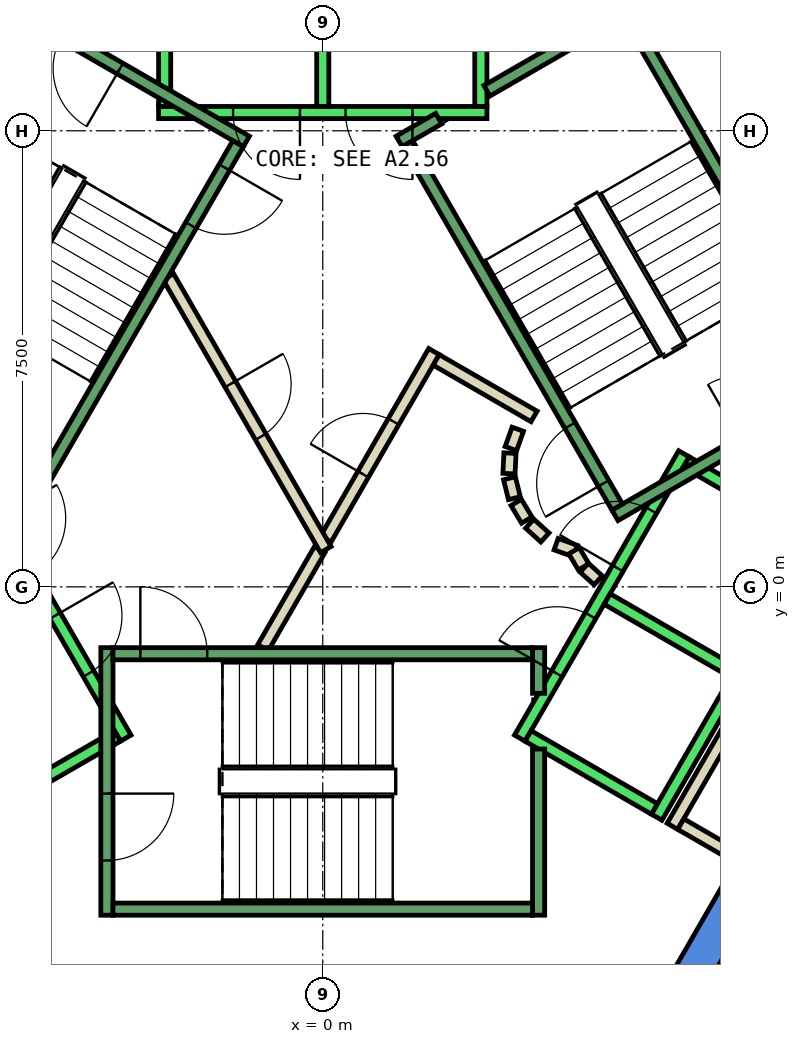
"""IFC4 building model, lengths in metres.
Left out: names, types, materials, properties, quantities, classifications, styles, units other than length and angle.
Written with IfcOpenShell. Run it as: python <this file> out.ifc"""

import sys

from ifc_helpers import new_model, si_unit, direction, frame, frame_2d, origin, place, context, subcontext, project, spatial, polyline, rectangle, outline, extrude, element, fill, save


model = new_model("IFC4")
c1 = context("Model", 3, precision=1e-05, world=origin(), true_north=direction((0.0, 1.0)))
c2 = subcontext(c1, "Body", "Model", "MODEL_VIEW")
j1 = project(units=[si_unit("LENGTHUNIT", "METRE"), si_unit("PLANEANGLEUNIT", "RADIAN")], contexts=[c1])
p1 = place(None, origin())
s1 = spatial("IfcSite", under=j1, at=p1, CompositionType="ELEMENT")
p2 = place(p1, origin())
s2 = spatial("IfcBuilding", under=s1, at=p2, CompositionType="ELEMENT")
p3 = place(p2, frame((0.0, 0.0, 266.6)))
s3 = spatial("IfcBuildingStorey", under=s2, at=p3, CompositionType="ELEMENT", Elevation=266.6)
p4 = place(p3, frame((0.0, 0.0, -0.34)))
e1 = element("IfcWall", 1, at=p4, inside=s3, PredefinedType="SHEAR", context=c2, shape_type="SweptSolid", body=[
    extrude(outline(polyline([(6.786, 10.747), (6.266, 10.447), (10.854, 2.5), (11.547, 2.5), (6.786, 10.747)])), origin(), (0.0, 0.0, 1.0), 3.6),
])
p5 = place(p3, frame((0.0, 0.0, -0.34)))
e2 = element("IfcWall", 2, at=p5, inside=s3, PredefinedType="SHEAR", context=c2, shape_type="SweptSolid", body=[
    extrude(outline(polyline([(5.774, -7.5), (11.547, 2.5), (10.854, 2.5), (5.427, -6.9), (5.774, -7.5)])), origin(), (0.0, 0.0, 1.0), 3.6),
])
p6 = place(p3, frame((5.751, -3.938, 0.0), z_axis=(0.0, 0.0, 1.0), x_axis=(0.500034260056, 0.866005622828, 0.0)))
e3 = element("IfcWall", 3, at=p6, inside=s3, PredefinedType="PARTITIONING", context=c2, shape_type="SweptSolid", body=[
    extrude(rectangle(XDim=5.399, YDim=0.2, at=frame_2d((2.7, 0.0))), origin(), (0.0, 0.0, 1.0), 3.26),
])
p7 = place(p3, frame((6.841, -4.452, 0.0), z_axis=(0.0, 0.0, 1.0), x_axis=(-0.86621513555, 0.499671230855, 0.0)))
e4 = element("IfcWall", 4, at=p7, inside=s3, PredefinedType="PARTITIONING", context=c2, shape_type="SweptSolid", body=[
    extrude(rectangle(XDim=1.1, YDim=0.2, at=frame_2d((0.55, 0.0))), origin(), (0.0, 0.0, 1.0), 3.26),
])
p8 = place(p3, frame((-0.982, -1.0, 0.0), z_axis=(0.0, 0.0, 1.0), x_axis=(0.50024047865, 0.865886518847, 0.0)))
e5 = element("IfcWall", 5, at=p8, inside=s3, PredefinedType="PARTITIONING", context=c2, shape_type="SweptSolid", body=[
    extrude(rectangle(XDim=1.863, YDim=0.2, at=frame_2d((0.931, 0.0))), origin(), (0.0, 0.0, 1.0), 3.26),
])
p9 = place(p3, frame((0.05, 0.787, 0.0), z_axis=(0.0, 0.0, 1.0), x_axis=(0.499954076797, 0.866051915934, 0.0)))
e6 = element("IfcWall", 6, at=p9, inside=s3, PredefinedType="PARTITIONING", context=c2, shape_type="SweptSolid", body=[
    extrude(rectangle(XDim=3.558, YDim=0.2, at=frame_2d((1.779, 0.0))), origin(), (0.0, 0.0, 1.0), 3.26),
])
p10 = place(p9, frame((1.229, 0.0, 0.0)))
e7 = element("IfcOpeningElement", 7, at=p10, cuts=e6, PredefinedType="OPENING", context=c2, shape_type="SweptSolid", body=[
    extrude(rectangle(XDim=1.0, YDim=2.1, at=frame_2d((0.5, 1.05))), frame((0.0, 0.11, 0.0), z_axis=(0.0, -1.0, 0.0), x_axis=(1.0, 0.0, 0.0)), (0.0, 0.0, 1.0), 0.22),
])
p11 = place(p3, frame((1.866, 3.732, 0.0), z_axis=(0.0, 0.0, 1.0), x_axis=(0.866043361281, -0.499968895414, 0.0)))
e8 = element("IfcWall", 8, at=p11, inside=s3, PredefinedType="PARTITIONING", context=c2, shape_type="SweptSolid", body=[
    extrude(rectangle(XDim=1.858, YDim=0.2, at=frame_2d((0.929, 0.0))), origin(), (0.0, 0.0, 1.0), 3.26),
])
p12 = place(p3, frame((3.208, 2.592, 0.0), z_axis=(0.0, 0.0, 1.0), x_axis=(-0.337388820924, -0.941365382578, 0.0)))
e9 = element("IfcWall", 9, at=p12, inside=s3, PredefinedType="PARTITIONING", context=c2, shape_type="SweptSolid", body=[
    extrude(rectangle(XDim=0.338, YDim=0.2, at=frame_2d((0.169, 0.0))), origin(), (0.0, 0.0, 1.0), 3.26),
])
p13 = place(p3, frame((3.079, 2.199, 0.0), z_axis=(0.0, 0.0, 1.0), x_axis=(-0.047771483479, -0.998858290933, 0.0)))
e10 = element("IfcWall", 10, at=p13, inside=s3, PredefinedType="PARTITIONING", context=c2, shape_type="SweptSolid", body=[
    extrude(rectangle(XDim=0.337, YDim=0.2, at=frame_2d((0.169, 0.0))), origin(), (0.0, 0.0, 1.0), 3.26),
])
p14 = place(p3, frame((3.07, 1.786, 0.0), z_axis=(0.0, 0.0, 1.0), x_axis=(0.242705583207, -0.970099994784, 0.0)))
e11 = element("IfcWall", 11, at=p14, inside=s3, PredefinedType="PARTITIONING", context=c2, shape_type="SweptSolid", body=[
    extrude(rectangle(XDim=0.338, YDim=0.2, at=frame_2d((0.169, 0.0))), origin(), (0.0, 0.0, 1.0), 3.26),
])
for number, where, z_axis, x_axis in (
    (12, (3.182, 1.388, 0.0), (0.0, 0.0, 1.0), (0.512, -0.859, 0.0)),
    (13, (3.404, 1.039, 0.0), (0.0, 0.0, 1.0), (0.74, -0.672, 0.0)),
):
    element("IfcWall", number, at=place(p3, frame(where, z_axis=z_axis, x_axis=x_axis)), inside=s3, PredefinedType="PARTITIONING", context=c2, shape_type="SweptSolid", body=[
        extrude(rectangle(XDim=0.338, YDim=0.2, at=frame_2d((0.169, 0.0))), origin(), (0.0, 0.0, 1.0), 3.26),
    ])
p15 = place(p3, frame((3.838, 0.702, 0.0), z_axis=(0.0, 0.0, 1.0), x_axis=(0.941035081519, -0.338308993895, 0.0)))
e14 = element("IfcWall", 14, at=p15, inside=s3, PredefinedType="PARTITIONING", context=c2, shape_type="SweptSolid", body=[
    extrude(rectangle(XDim=0.337, YDim=0.2, at=frame_2d((0.168, 0.0))), origin(), (0.0, 0.0, 1.0), 3.26),
])
p16 = place(p3, frame((4.132, 0.593, 0.0), z_axis=(0.0, 0.0, 1.0), x_axis=(0.513561617048, -0.858052717201, 0.0)))
e15 = element("IfcWall", 15, at=p16, inside=s3, PredefinedType="PARTITIONING", context=c2, shape_type="SweptSolid", body=[
    extrude(rectangle(XDim=0.308, YDim=0.2, at=frame_2d((0.154, 0.0))), origin(), (0.0, 0.0, 1.0), 3.26),
])
p17 = place(p3, frame((4.301, 0.315, 0.0), z_axis=(0.0, 0.0, 1.0), x_axis=(0.741798017506, -0.670623367639, 0.0)))
e16 = element("IfcWall", 16, at=p17, inside=s3, PredefinedType="PARTITIONING", context=c2, shape_type="SweptSolid", body=[
    extrude(rectangle(XDim=0.309, YDim=0.2, at=frame_2d((0.154, 0.0))), origin(), (0.0, 0.0, 1.0), 3.26),
])
p18 = place(p3, frame((-2.54, 5.1, 0.0), z_axis=(0.0, 0.0, 1.0), x_axis=(0.499925051871, -0.866068670783, 0.0)))
e17 = element("IfcWall", 17, at=p18, inside=s3, PredefinedType="PARTITIONING", context=c2, shape_type="SweptSolid", body=[
    extrude(rectangle(XDim=5.181, YDim=0.2, at=frame_2d((2.59, 0.0))), origin(), (0.0, 0.0, 1.0), 3.26),
])
p19 = place(p18, frame((2.04, 0.0, 0.0)))
e18 = element("IfcOpeningElement", 18, at=p19, cuts=e17, PredefinedType="OPENING", context=c2, shape_type="SweptSolid", body=[
    extrude(rectangle(XDim=1.0, YDim=2.1, at=frame_2d((0.5, 1.05))), frame((0.0, 0.11, 0.0), z_axis=(0.0, -1.0, 0.0), x_axis=(1.0, 0.0, 0.0)), (0.0, 0.0, 1.0), 0.22),
])
p20 = place(p3, frame((2.7, 7.8, 0.0), z_axis=(0.0, 0.0, 1.0), x_axis=(-1.0, 0.0, 0.0)))
e19 = element("IfcWall", 19, at=p20, inside=s3, PredefinedType="STANDARD", context=c2, shape_type="SweptSolid", body=[
    extrude(rectangle(XDim=5.4, YDim=0.2, at=frame_2d((2.7, 0.0))), origin(), (0.0, 0.0, 1.0), 3.26),
])
p21 = place(p20, frame((1.225, 0.0, 0.0)))
e20 = element("IfcOpeningElement", 20, at=p21, cuts=e19, PredefinedType="OPENING", context=c2, shape_type="SweptSolid", body=[
    extrude(rectangle(XDim=1.1, YDim=2.1, at=frame_2d((0.55, 1.05))), frame((0.0, 0.11, 0.0), z_axis=(0.0, -1.0, 0.0), x_axis=(1.0, 0.0, 0.0)), (0.0, 0.0, 1.0), 0.22),
])
p22 = place(p20, frame((3.075, 0.0, 0.0)))
e21 = element("IfcOpeningElement", 21, at=p22, cuts=e19, PredefinedType="OPENING", context=c2, shape_type="SweptSolid", body=[
    extrude(rectangle(XDim=1.1, YDim=2.1, at=frame_2d((0.55, 1.05))), frame((0.0, 0.11, 0.0), z_axis=(0.0, -1.0, 0.0), x_axis=(1.0, 0.0, 0.0)), (0.0, 0.0, 1.0), 0.22),
])
for number, where, z_axis, x_axis in (
    (22, (2.6, 7.9, 0.0), (0.0, 0.0, 1.0), (0.0, 1.0, 0.0)),
    (23, (0.0, 7.9, 0.0), (0.0, 0.0, 1.0), (0.0, 1.0, 0.0)),
    (24, (-2.6, 7.9, 0.0), (0.0, 0.0, 1.0), (0.0, 1.0, 0.0)),
):
    element("IfcWall", number, at=place(p3, frame(where, z_axis=z_axis, x_axis=x_axis)), inside=s3, PredefinedType="STANDARD", context=c2, shape_type="SweptSolid", body=[
        extrude(rectangle(XDim=2.4, YDim=0.2, at=frame_2d((1.2, 0.0))), origin(), (0.0, 0.0, 1.0), 3.26),
    ])
p23 = place(p3, frame((-5.94, 2.188, 0.0), z_axis=(0.0, 0.0, 1.0), x_axis=(0.500034260056, -0.866005622828, 0.0)))
e25 = element("IfcWall", 25, at=p23, inside=s3, PredefinedType="STANDARD", context=c2, shape_type="SweptSolid", body=[
    extrude(rectangle(XDim=5.399, YDim=0.2, at=frame_2d((2.7, 0.0))), origin(), (0.0, 0.0, 1.0), 3.26),
])
p24 = place(p23, frame((3.075, 0.0, 0.0)))
e26 = element("IfcOpeningElement", 26, at=p24, cuts=e25, PredefinedType="OPENING", context=c2, shape_type="SweptSolid", body=[
    extrude(rectangle(XDim=1.1, YDim=2.1, at=frame_2d((0.55, 1.05))), frame((0.0, 0.11, 0.0), z_axis=(0.0, -1.0, 0.0), x_axis=(1.0, 0.0, 0.0)), (0.0, 0.0, 1.0), 0.22),
])
p25 = place(p23, frame((1.225, 0.0, 0.0)))
e27 = element("IfcOpeningElement", 27, at=p25, cuts=e25, PredefinedType="OPENING", context=c2, shape_type="SweptSolid", body=[
    extrude(rectangle(XDim=1.1, YDim=2.1, at=frame_2d((0.55, 1.05))), frame((0.0, 0.11, 0.0), z_axis=(0.0, -1.0, 0.0), x_axis=(1.0, 0.0, 0.0)), (0.0, 0.0, 1.0), 0.22),
])
p26 = place(p3, frame((-3.377, -2.452, 0.0), z_axis=(0.0, 0.0, 1.0), x_axis=(-0.865955154139, -0.50012165622, 0.0)))
e28 = element("IfcWall", 28, at=p26, inside=s3, PredefinedType="STANDARD", context=c2, shape_type="SweptSolid", body=[
    extrude(rectangle(XDim=2.4, YDim=0.2, at=frame_2d((1.2, 0.0))), origin(), (0.0, 0.0, 1.0), 3.26),
])
p27 = place(p3, frame((3.24, -2.488, 0.0), z_axis=(0.0, 0.0, 1.0), x_axis=(0.500034260056, 0.866005622828, 0.0)))
e29 = element("IfcWall", 29, at=p27, inside=s3, PredefinedType="STANDARD", context=c2, shape_type="SweptSolid", body=[
    extrude(rectangle(XDim=5.399, YDim=0.2, at=frame_2d((2.7, 0.0))), origin(), (0.0, 0.0, 1.0), 3.26),
])
p28 = place(p27, frame((3.225, 0.0, 0.0)))
e30 = element("IfcOpeningElement", 30, at=p28, cuts=e29, PredefinedType="OPENING", context=c2, shape_type="SweptSolid", body=[
    extrude(rectangle(XDim=1.1, YDim=2.1, at=frame_2d((0.55, 1.05))), frame((0.0, 0.11, 0.0), z_axis=(0.0, -1.0, 0.0), x_axis=(1.0, 0.0, 0.0)), (0.0, 0.0, 1.0), 0.22),
])
p29 = place(p27, frame((1.225, 0.0, 0.0)))
e31 = element("IfcOpeningElement", 31, at=p29, cuts=e29, PredefinedType="OPENING", context=c2, shape_type="SweptSolid", body=[
    extrude(rectangle(XDim=1.1, YDim=2.1, at=frame_2d((0.55, 1.05))), frame((0.0, 0.11, 0.0), z_axis=(0.0, -1.0, 0.0), x_axis=(1.0, 0.0, 0.0)), (0.0, 0.0, 1.0), 0.22),
])
p30 = place(p3, frame((5.492, -3.788, 0.0), z_axis=(0.0, 0.0, 1.0), x_axis=(0.500034260056, 0.866005622828, 0.0)))
e32 = element("IfcWall", 32, at=p30, inside=s3, PredefinedType="STANDARD", context=c2, shape_type="SweptSolid", body=[
    extrude(rectangle(XDim=5.399, YDim=0.2, at=frame_2d((2.7, 0.0))), origin(), (0.0, 0.0, 1.0), 3.26),
])
p31 = place(p3, frame((3.377, -2.452, 0.0), z_axis=(0.0, 0.0, 1.0), x_axis=(0.865955154139, -0.50012165622, 0.0)))
e33 = element("IfcWall", 33, at=p31, inside=s3, PredefinedType="STANDARD", context=c2, shape_type="SweptSolid", body=[
    extrude(rectangle(XDim=2.4, YDim=0.2, at=frame_2d((1.2, 0.0))), origin(), (0.0, 0.0, 1.0), 3.26),
])
for number, where, z_axis, x_axis in (
    (34, (4.677, -0.2, 0.0), (0.0, 0.0, 1.0), (0.866, -0.5, 0.0)),
    (35, (5.977, 2.052, 0.0), (0.0, 0.0, 1.0), (0.866, -0.5, 0.0)),
):
    element("IfcWall", number, at=place(p3, frame(where, z_axis=z_axis, x_axis=x_axis)), inside=s3, PredefinedType="STANDARD", context=c2, shape_type="SweptSolid", body=[
        extrude(rectangle(XDim=2.399, YDim=0.2, at=frame_2d((1.2, 0.0))), origin(), (0.0, 0.0, 1.0), 3.26),
    ])
p32 = place(p3, frame((-3.55, -1.0, 0.0), z_axis=(0.0, 0.0, 1.0), x_axis=(0.0, -1.0, 0.0)))
e36 = element("IfcWall", 36, at=p32, inside=s3, PredefinedType="STANDARD", context=c2, shape_type="SweptSolid", body=[
    extrude(rectangle(XDim=4.4, YDim=0.2, at=frame_2d((2.2, 0.0))), origin(), (0.0, 0.0, 1.0), 3.26),
])
p33 = place(p32, frame((2.4, 0.0, 0.0)))
e37 = element("IfcOpeningElement", 37, at=p33, cuts=e36, PredefinedType="OPENING", context=c2, shape_type="SweptSolid", body=[
    extrude(rectangle(XDim=1.1, YDim=2.2, at=frame_2d((0.55, 1.1))), frame((0.0, 0.11, 0.0), z_axis=(0.0, -1.0, 0.0), x_axis=(1.0, 0.0, 0.0)), (0.0, 0.0, 1.0), 0.22),
])
p34 = place(p3, frame((3.55, -2.667, 0.0), z_axis=(0.0, 0.0, 1.0), x_axis=(0.0, -1.0, 0.0)))
e38 = element("IfcWall", 38, at=p34, inside=s3, PredefinedType="STANDARD", context=c2, shape_type="SweptSolid", body=[
    extrude(rectangle(XDim=2.733, YDim=0.2, at=frame_2d((1.366, 0.0))), origin(), (0.0, 0.0, 1.0), 3.26),
])
p35 = place(p3, frame((3.55, -1.0, 0.0), z_axis=(0.0, 0.0, 1.0), x_axis=(0.0, -1.0, 0.0)))
e39 = element("IfcWall", 39, at=p35, inside=s3, PredefinedType="STANDARD", context=c2, shape_type="SweptSolid", body=[
    extrude(rectangle(XDim=0.751, YDim=0.2, at=frame_2d((0.375, 0.0))), origin(), (0.0, 0.0, 1.0), 3.26),
])
p36 = place(p3, frame((-3.45, -1.1, 0.0), z_axis=(0.0, 0.0, 1.0), x_axis=(1.0, 0.0, 0.0)))
e40 = element("IfcWall", 40, at=p36, inside=s3, PredefinedType="STANDARD", context=c2, shape_type="SweptSolid", body=[
    extrude(rectangle(XDim=6.9, YDim=0.2, at=frame_2d((3.45, 0.0))), origin(), (0.0, 0.0, 1.0), 3.26),
])
p37 = place(p36, frame((0.45, 0.0, 0.0)))
e41 = element("IfcOpeningElement", 41, at=p37, cuts=e40, PredefinedType="OPENING", context=c2, shape_type="SweptSolid", body=[
    extrude(rectangle(XDim=1.1, YDim=2.2, at=frame_2d((0.55, 1.1))), frame((0.0, 0.11, 0.0), z_axis=(0.0, -1.0, 0.0), x_axis=(1.0, 0.0, 0.0)), (0.0, 0.0, 1.0), 0.22),
])
p38 = place(p3, frame((-3.45, -5.3, 0.0), z_axis=(0.0, 0.0, 1.0), x_axis=(1.0, 0.0, 0.0)))
e42 = element("IfcWall", 42, at=p38, inside=s3, PredefinedType="STANDARD", context=c2, shape_type="SweptSolid", body=[
    extrude(rectangle(XDim=6.9, YDim=0.2, at=frame_2d((3.45, 0.0))), origin(), (0.0, 0.0, 1.0), 3.26),
])
p39 = place(p3, frame((4.806, 1.176, 0.0), z_axis=(0.0, 0.0, 1.0), x_axis=(0.866059941101, 0.499940174841, 0.0)))
e43 = element("IfcWall", 43, at=p39, inside=s3, PredefinedType="STANDARD", context=c2, shape_type="SweptSolid", body=[
    extrude(rectangle(XDim=4.4, YDim=0.2, at=frame_2d((2.2, 0.0))), origin(), (0.0, 0.0, 1.0), 3.26),
])
p40 = place(p39, frame((2.4, 0.0, 0.0)))
e44 = element("IfcOpeningElement", 44, at=p40, cuts=e43, PredefinedType="OPENING", context=c2, shape_type="SweptSolid", body=[
    extrude(rectangle(XDim=1.1, YDim=2.2, at=frame_2d((0.55, 1.1))), frame((0.0, 0.11, 0.0), z_axis=(0.0, -1.0, 0.0), x_axis=(1.0, 0.0, 0.0)), (0.0, 0.0, 1.0), 0.22),
])
p41 = place(p3, frame((2.7, 8.158, 0.0), z_axis=(0.0, 0.0, 1.0), x_axis=(0.86611865017, 0.499838457731, 0.0)))
e45 = element("IfcWall", 45, at=p41, inside=s3, PredefinedType="STANDARD", context=c2, shape_type="SweptSolid", body=[
    extrude(rectangle(XDim=2.733, YDim=0.2, at=frame_2d((1.366, 0.0))), origin(), (0.0, 0.0, 1.0), 3.26),
])
p42 = place(p3, frame((1.256, 7.324, 0.0), z_axis=(0.0, 0.0, 1.0), x_axis=(0.865915093549, 0.500191014278, 0.0)))
e46 = element("IfcWall", 46, at=p42, inside=s3, PredefinedType="STANDARD", context=c2, shape_type="SweptSolid", body=[
    extrude(rectangle(XDim=0.752, YDim=0.2, at=frame_2d((0.376, 0.0))), origin(), (0.0, 0.0, 1.0), 3.26),
])
p43 = place(p3, frame((4.843, 1.312, 0.0), z_axis=(0.0, 0.0, 1.0), x_axis=(-0.499963383562, 0.866046543262, 0.0)))
e47 = element("IfcWall", 47, at=p43, inside=s3, PredefinedType="STANDARD", context=c2, shape_type="SweptSolid", body=[
    extrude(rectangle(XDim=6.9, YDim=0.2, at=frame_2d((3.45, 0.0))), origin(), (0.0, 0.0, 1.0), 3.26),
])
p44 = place(p43, frame((0.45, 0.0, 0.0)))
e48 = element("IfcOpeningElement", 48, at=p44, cuts=e47, PredefinedType="OPENING", context=c2, shape_type="SweptSolid", body=[
    extrude(rectangle(XDim=1.1, YDim=2.2, at=frame_2d((0.55, 1.1))), frame((0.0, 0.11, 0.0), z_axis=(0.0, -1.0, 0.0), x_axis=(1.0, 0.0, 0.0)), (0.0, 0.0, 1.0), 0.22),
])
p45 = place(p3, frame((8.48, 3.412, 0.0), z_axis=(0.0, 0.0, 1.0), x_axis=(-0.499978703459, 0.866037698999, 0.0)))
e49 = element("IfcWall", 49, at=p45, inside=s3, PredefinedType="STANDARD", context=c2, shape_type="SweptSolid", body=[
    extrude(rectangle(XDim=6.9, YDim=0.2, at=frame_2d((3.45, 0.0))), origin(), (0.0, 0.0, 1.0), 3.26),
])
p46 = place(p3, frame((-1.256, 7.324, 0.0), z_axis=(0.0, 0.0, 1.0), x_axis=(-0.866046073146, 0.499964197906, 0.0)))
e50 = element("IfcWall", 50, at=p46, inside=s3, PredefinedType="STANDARD", context=c2, shape_type="SweptSolid", body=[
    extrude(rectangle(XDim=4.4, YDim=0.2, at=frame_2d((2.2, 0.0))), origin(), (0.0, 0.0, 1.0), 3.26),
])
p47 = place(p46, frame((2.4, 0.0, 0.0)))
e51 = element("IfcOpeningElement", 51, at=p47, cuts=e50, PredefinedType="OPENING", context=c2, shape_type="SweptSolid", body=[
    extrude(rectangle(XDim=1.1, YDim=2.2, at=frame_2d((0.55, 1.1))), frame((0.0, 0.11, 0.0), z_axis=(0.0, -1.0, 0.0), x_axis=(1.0, 0.0, 0.0)), (0.0, 0.0, 1.0), 0.22),
])
p48 = place(p3, frame((-1.393, 7.288, 0.0), z_axis=(0.0, 0.0, 1.0), x_axis=(-0.499963383562, -0.866046543262, 0.0)))
e52 = element("IfcWall", 52, at=p48, inside=s3, PredefinedType="STANDARD", context=c2, shape_type="SweptSolid", body=[
    extrude(rectangle(XDim=6.9, YDim=0.2, at=frame_2d((3.45, 0.0))), origin(), (0.0, 0.0, 1.0), 3.26),
])
p49 = place(p48, frame((0.45, 0.0, 0.0)))
e53 = element("IfcOpeningElement", 53, at=p49, cuts=e52, PredefinedType="OPENING", context=c2, shape_type="SweptSolid", body=[
    extrude(rectangle(XDim=1.1, YDim=2.2, at=frame_2d((0.55, 1.1))), frame((0.0, 0.11, 0.0), z_axis=(0.0, -1.0, 0.0), x_axis=(1.0, 0.0, 0.0)), (0.0, 0.0, 1.0), 0.22),
])
p50 = place(p10, origin())
e54 = element("IfcDoor", 54, at=p50, inside=s3, OperationType="SINGLE_SWING_RIGHT", PredefinedType="DOOR", context=c2, shape_type="SweptSolid", body=[
    extrude(rectangle(XDim=1.0, YDim=2.1, at=frame_2d((0.5, 1.05))), frame((0.0, 0.025, 0.0), z_axis=(0.0, -1.0, 0.0), x_axis=(1.0, 0.0, 0.0)), (0.0, 0.0, 1.0), 0.05),
])
fill(e7, e54)
p51 = place(p19, origin())
e55 = element("IfcDoor", 55, at=p51, inside=s3, OperationType="SINGLE_SWING_RIGHT", PredefinedType="DOOR", context=c2, shape_type="SweptSolid", body=[
    extrude(rectangle(XDim=1.0, YDim=2.1, at=frame_2d((0.5, 1.05))), frame((0.0, 0.025, 0.0), z_axis=(0.0, -1.0, 0.0), x_axis=(1.0, 0.0, 0.0)), (0.0, 0.0, 1.0), 0.05),
])
fill(e18, e55)
p52 = place(p21, origin())
e56 = element("IfcDoor", 56, at=p52, inside=s3, OperationType="SLIDING_TO_LEFT", PredefinedType="DOOR", context=c2, shape_type="SweptSolid", body=[
    extrude(rectangle(XDim=1.1, YDim=2.1, at=frame_2d((0.55, 1.05))), frame((0.0, 0.025, 0.0), z_axis=(0.0, -1.0, 0.0), x_axis=(1.0, 0.0, 0.0)), (0.0, 0.0, 1.0), 0.05),
])
fill(e20, e56)
p53 = place(p22, origin())
e57 = element("IfcDoor", 57, at=p53, inside=s3, OperationType="SLIDING_TO_LEFT", PredefinedType="DOOR", context=c2, shape_type="SweptSolid", body=[
    extrude(rectangle(XDim=1.1, YDim=2.1, at=frame_2d((0.55, 1.05))), frame((0.0, 0.025, 0.0), z_axis=(0.0, -1.0, 0.0), x_axis=(1.0, 0.0, 0.0)), (0.0, 0.0, 1.0), 0.05),
])
fill(e21, e57)
p54 = place(p28, origin())
e58 = element("IfcDoor", 58, at=p54, inside=s3, OperationType="SLIDING_TO_LEFT", PredefinedType="DOOR", context=c2, shape_type="SweptSolid", body=[
    extrude(rectangle(XDim=1.1, YDim=2.1, at=frame_2d((0.55, 1.05))), frame((0.0, 0.025, 0.0), z_axis=(0.0, -1.0, 0.0), x_axis=(1.0, 0.0, 0.0)), (0.0, 0.0, 1.0), 0.05),
])
fill(e30, e58)
p55 = place(p24, origin())
e59 = element("IfcDoor", 59, at=p55, inside=s3, OperationType="SLIDING_TO_LEFT", PredefinedType="DOOR", context=c2, shape_type="SweptSolid", body=[
    extrude(rectangle(XDim=1.1, YDim=2.1, at=frame_2d((0.55, 1.05))), frame((0.0, 0.025, 0.0), z_axis=(0.0, -1.0, 0.0), x_axis=(1.0, 0.0, 0.0)), (0.0, 0.0, 1.0), 0.05),
])
fill(e26, e59)
p56 = place(p29, origin())
e60 = element("IfcDoor", 60, at=p56, inside=s3, OperationType="SLIDING_TO_LEFT", PredefinedType="DOOR", context=c2, shape_type="SweptSolid", body=[
    extrude(rectangle(XDim=1.1, YDim=2.1, at=frame_2d((0.55, 1.05))), frame((0.0, 0.025, 0.0), z_axis=(0.0, -1.0, 0.0), x_axis=(1.0, 0.0, 0.0)), (0.0, 0.0, 1.0), 0.05),
])
fill(e31, e60)
p57 = place(p37, origin())
e61 = element("IfcDoor", 61, at=p57, inside=s3, OperationType="SINGLE_SWING_LEFT", PredefinedType="DOOR", context=c2, shape_type="SweptSolid", body=[
    extrude(rectangle(XDim=1.1, YDim=2.2, at=frame_2d((0.55, 1.1))), frame((0.0, 0.025, 0.0), z_axis=(0.0, -1.0, 0.0), x_axis=(1.0, 0.0, 0.0)), (0.0, 0.0, 1.0), 0.05),
])
fill(e41, e61)
p58 = place(p33, origin())
e62 = element("IfcDoor", 62, at=p58, inside=s3, OperationType="SINGLE_SWING_LEFT", PredefinedType="DOOR", context=c2, shape_type="SweptSolid", body=[
    extrude(rectangle(XDim=1.1, YDim=2.2, at=frame_2d((0.55, 1.1))), frame((0.0, 0.025, 0.0), z_axis=(0.0, -1.0, 0.0), x_axis=(1.0, 0.0, 0.0)), (0.0, 0.0, 1.0), 0.05),
])
fill(e37, e62)
p59 = place(p44, origin())
e63 = element("IfcDoor", 63, at=p59, inside=s3, OperationType="SINGLE_SWING_LEFT", PredefinedType="DOOR", context=c2, shape_type="SweptSolid", body=[
    extrude(rectangle(XDim=1.1, YDim=2.2, at=frame_2d((0.55, 1.1))), frame((0.0, 0.025, 0.0), z_axis=(0.0, -1.0, 0.0), x_axis=(1.0, 0.0, 0.0)), (0.0, 0.0, 1.0), 0.05),
])
fill(e48, e63)
p60 = place(p49, origin())
e64 = element("IfcDoor", 64, at=p60, inside=s3, OperationType="SINGLE_SWING_LEFT", PredefinedType="DOOR", context=c2, shape_type="SweptSolid", body=[
    extrude(rectangle(XDim=1.1, YDim=2.2, at=frame_2d((0.55, 1.1))), frame((0.0, 0.025, 0.0), z_axis=(0.0, -1.0, 0.0), x_axis=(1.0, 0.0, 0.0)), (0.0, 0.0, 1.0), 0.05),
])
fill(e53, e64)
p61 = place(p47, origin())
e65 = element("IfcDoor", 65, at=p61, inside=s3, OperationType="SINGLE_SWING_LEFT", PredefinedType="DOOR", context=c2, shape_type="SweptSolid", body=[
    extrude(rectangle(XDim=1.1, YDim=2.2, at=frame_2d((0.55, 1.1))), frame((0.0, 0.025, 0.0), z_axis=(0.0, -1.0, 0.0), x_axis=(1.0, 0.0, 0.0)), (0.0, 0.0, 1.0), 0.05),
])
fill(e51, e65)
save(model, sys.argv[1])
